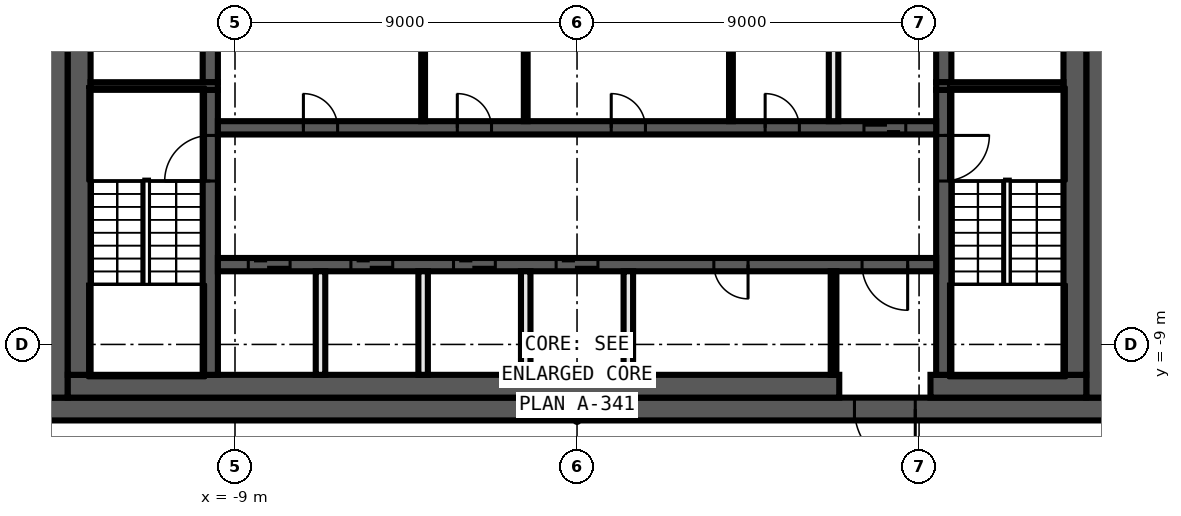
"""IFC4 building model, lengths in metres.
Left out: names, types, materials, properties, quantities, classifications, styles, units other than length and angle.
Written with IfcOpenShell. Run it as: python <this file> out.ifc"""

import sys

from ifc_helpers import new_model, si_unit, direction, frame, frame_2d, origin, place, context, subcontext, project, spatial, rectangle, extrude, element, fill, save


model = new_model("IFC4")
c1 = context("Model", 3, precision=1e-05, world=origin(), true_north=direction((0.0, 1.0)))
c2 = subcontext(c1, "Body", "Model", "MODEL_VIEW")
j1 = project(units=[si_unit("LENGTHUNIT", "METRE"), si_unit("PLANEANGLEUNIT", "RADIAN")], contexts=[c1])
p1 = place(None, origin())
s1 = spatial("IfcSite", under=j1, at=p1, CompositionType="ELEMENT")
p2 = place(p1, origin())
s2 = spatial("IfcBuilding", under=s1, at=p2, CompositionType="ELEMENT")
p3 = place(p2, frame((0.0, 0.0, 353.0)))
s3 = spatial("IfcBuildingStorey", under=s2, at=p3, CompositionType="ELEMENT", Elevation=353.0)
p4 = place(p3, frame((14.0, -10.7, 0.0), z_axis=(0.0, 0.0, 1.0), x_axis=(-1.0, 0.0, 0.0)))
e1 = element("IfcWall", 1, at=p4, inside=s3, PredefinedType="SHEAR", context=c2, shape_type="SweptSolid", body=[
    extrude(rectangle(XDim=28.0, YDim=0.6, at=frame_2d((14.0, 0.0))), origin(), (0.0, 0.0, 1.0), 5.6),
])
p5 = place(p4, frame((5.1, 0.0, 0.0)))
e2 = element("IfcOpeningElement", 2, at=p5, cuts=e1, PredefinedType="OPENING", context=c2, shape_type="SweptSolid", body=[
    extrude(rectangle(XDim=1.6, YDim=2.1, at=frame_2d((0.8, 1.05))), frame((0.0, 0.31, 0.0), z_axis=(0.0, -1.0, 0.0), x_axis=(1.0, 0.0, 0.0)), (0.0, 0.0, 1.0), 0.62),
])
for number, where, z_axis, x_axis in (
    (3, (13.7, 10.4, 0.0), (0.0, 0.0, 1.0), (0.0, -1.0, 0.0)),
    (4, (-13.7, -10.4, 0.0), (0.0, 0.0, 1.0), (0.0, 1.0, 0.0)),
):
    element("IfcWall", number, at=place(p3, frame(where, z_axis=z_axis, x_axis=x_axis)), inside=s3, PredefinedType="SHEAR", context=c2, shape_type="SweptSolid", body=[
        extrude(rectangle(XDim=20.8, YDim=0.6, at=frame_2d((10.4, 0.0))), origin(), (0.0, 0.0, 1.0), 5.6),
    ])
p6 = place(p3, frame((13.4, -10.1, 0.0), z_axis=(0.0, 0.0, 1.0), x_axis=(-1.0, 0.0, 0.0)))
e5 = element("IfcWall", 5, at=p6, inside=s3, PredefinedType="SHEAR", context=c2, shape_type="SweptSolid", body=[
    extrude(rectangle(XDim=4.1, YDim=0.6, at=frame_2d((2.05, 0.0))), origin(), (0.0, 0.0, 1.0), 5.6),
])
p7 = place(p3, frame((6.9, -10.1, 0.0), z_axis=(0.0, 0.0, 1.0), x_axis=(-1.0, 0.0, 0.0)))
e6 = element("IfcWall", 6, at=p7, inside=s3, PredefinedType="SHEAR", context=c2, shape_type="SweptSolid", body=[
    extrude(rectangle(XDim=20.3, YDim=0.6, at=frame_2d((10.15, 0.0))), origin(), (0.0, 0.0, 1.0), 5.6),
])
for number, where, z_axis, x_axis in (
    (7, (13.1, 9.8, 0.0), (0.0, 0.0, 1.0), (0.0, -1.0, 0.0)),
    (8, (-13.1, -9.8, 0.0), (0.0, 0.0, 1.0), (0.0, 1.0, 0.0)),
):
    element("IfcWall", number, at=place(p3, frame(where, z_axis=z_axis, x_axis=x_axis)), inside=s3, PredefinedType="SHEAR", context=c2, shape_type="SweptSolid", body=[
        extrude(rectangle(XDim=19.6, YDim=0.6, at=frame_2d((9.8, 0.0))), origin(), (0.0, 0.0, 1.0), 5.6),
    ])
p8 = place(p3, frame((9.65, -2.3, 0.0), z_axis=(0.0, 0.0, 1.0), x_axis=(0.0, -1.0, 0.0)))
e9 = element("IfcWall", 9, at=p8, inside=s3, PredefinedType="SHEAR", context=c2, shape_type="SweptSolid", body=[
    extrude(rectangle(XDim=7.5, YDim=0.4, at=frame_2d((3.75, 0.0))), origin(), (0.0, 0.0, 1.0), 5.6),
])
p9 = place(p8, frame((1.2, 0.0, 0.0)))
e10 = element("IfcOpeningElement", 10, at=p9, cuts=e9, PredefinedType="OPENING", context=c2, shape_type="SweptSolid", body=[
    extrude(rectangle(XDim=1.2, YDim=2.1, at=frame_2d((0.6, 1.05))), frame((0.0, 0.21, 0.0), z_axis=(0.0, -1.0, 0.0), x_axis=(1.0, 0.0, 0.0)), (0.0, 0.0, 1.0), 0.42),
])
p10 = place(p3, frame((9.65, 2.1, 0.0), z_axis=(0.0, 0.0, 1.0), x_axis=(0.0, -1.0, 0.0)))
e11 = element("IfcWall", 11, at=p10, inside=s3, PredefinedType="SHEAR", context=c2, shape_type="SweptSolid", body=[
    extrude(rectangle(XDim=4.2, YDim=0.4, at=frame_2d((2.1, 0.0))), origin(), (0.0, 0.0, 1.0), 5.6),
])
p11 = place(p10, frame((0.15, 0.0, 0.0)))
e12 = element("IfcOpeningElement", 12, at=p11, cuts=e11, PredefinedType="OPENING", context=c2, shape_type="SweptSolid", body=[
    extrude(rectangle(XDim=0.9, YDim=2.1, at=frame_2d((0.45, 1.05))), frame((0.0, 0.21, 0.0), z_axis=(0.0, -1.0, 0.0), x_axis=(1.0, 0.0, 0.0)), (0.0, 0.0, 1.0), 0.42),
])
p12 = place(p3, frame((-9.65, -9.8, 0.0), z_axis=(0.0, 0.0, 1.0), x_axis=(0.0, 1.0, 0.0)))
e13 = element("IfcWall", 13, at=p12, inside=s3, PredefinedType="SHEAR", context=c2, shape_type="SweptSolid", body=[
    extrude(rectangle(XDim=7.5, YDim=0.4, at=frame_2d((3.75, 0.0))), origin(), (0.0, 0.0, 1.0), 5.6),
])
p13 = place(p12, frame((5.1, 0.0, 0.0)))
e14 = element("IfcOpeningElement", 14, at=p13, cuts=e13, PredefinedType="OPENING", context=c2, shape_type="SweptSolid", body=[
    extrude(rectangle(XDim=1.2, YDim=2.1, at=frame_2d((0.6, 1.05))), frame((0.0, 0.21, 0.0), z_axis=(0.0, -1.0, 0.0), x_axis=(1.0, 0.0, 0.0)), (0.0, 0.0, 1.0), 0.42),
])
p14 = place(p3, frame((-9.65, -2.1, 0.0), z_axis=(0.0, 0.0, 1.0), x_axis=(0.0, 1.0, 0.0)))
e15 = element("IfcWall", 15, at=p14, inside=s3, PredefinedType="SHEAR", context=c2, shape_type="SweptSolid", body=[
    extrude(rectangle(XDim=4.2, YDim=0.4, at=frame_2d((2.1, 0.0))), origin(), (0.0, 0.0, 1.0), 5.6),
])
for number, where, z_axis, x_axis in (
    (16, (9.45, -2.2, 0.0), (0.0, 0.0, 1.0), (1.0, 0.0, 0.0)),
    (17, (-9.45, -2.2, 0.0), (0.0, 0.0, 1.0), (-1.0, 0.0, 0.0)),
):
    element("IfcWall", number, at=place(p3, frame(where, z_axis=z_axis, x_axis=x_axis)), inside=s3, PredefinedType="SHEAR", context=c2, shape_type="SweptSolid", body=[
        extrude(rectangle(XDim=3.35, YDim=0.2, at=frame_2d((1.675, 0.0))), origin(), (0.0, 0.0, 1.0), 5.6),
    ])
p15 = place(p3, frame((-9.45, -3.3, 0.0), z_axis=(0.0, 0.0, 1.0), x_axis=(1.0, 0.0, 0.0)))
e18 = element("IfcWall", 18, at=p15, inside=s3, PredefinedType="SHEAR", context=c2, shape_type="SweptSolid", body=[
    extrude(rectangle(XDim=18.9, YDim=0.35, at=frame_2d((9.45, 0.0))), origin(), (0.0, 0.0, 1.0), 5.6),
])
p16 = place(p15, frame((17.0, 0.0, 0.0)))
e19 = element("IfcOpeningElement", 19, at=p16, cuts=e18, PredefinedType="OPENING", context=c2, shape_type="SweptSolid", body=[
    extrude(rectangle(XDim=1.1, YDim=2.1, at=frame_2d((0.55, 1.05))), frame((0.0, 0.185, 0.0), z_axis=(0.0, -1.0, 0.0), x_axis=(1.0, 0.0, 0.0)), (0.0, 0.0, 1.0), 0.37),
])
p17 = place(p15, frame((2.25, 0.0, 0.0)))
e20 = element("IfcOpeningElement", 20, at=p17, cuts=e18, PredefinedType="OPENING", context=c2, shape_type="SweptSolid", body=[
    extrude(rectangle(XDim=0.9, YDim=2.1, at=frame_2d((0.45, 1.05))), frame((0.0, 0.185, 0.0), z_axis=(0.0, -1.0, 0.0), x_axis=(1.0, 0.0, 0.0)), (0.0, 0.0, 1.0), 0.37),
])
p18 = place(p15, frame((6.3, 0.0, 0.0)))
e21 = element("IfcOpeningElement", 21, at=p18, cuts=e18, PredefinedType="OPENING", context=c2, shape_type="SweptSolid", body=[
    extrude(rectangle(XDim=0.9, YDim=2.1, at=frame_2d((0.45, 1.05))), frame((0.0, 0.185, 0.0), z_axis=(0.0, -1.0, 0.0), x_axis=(1.0, 0.0, 0.0)), (0.0, 0.0, 1.0), 0.37),
])
p19 = place(p15, frame((10.35, 0.0, 0.0)))
e22 = element("IfcOpeningElement", 22, at=p19, cuts=e18, PredefinedType="OPENING", context=c2, shape_type="SweptSolid", body=[
    extrude(rectangle(XDim=0.9, YDim=2.1, at=frame_2d((0.45, 1.05))), frame((0.0, 0.185, 0.0), z_axis=(0.0, -1.0, 0.0), x_axis=(1.0, 0.0, 0.0)), (0.0, 0.0, 1.0), 0.37),
])
p20 = place(p15, frame((14.4, 0.0, 0.0)))
e23 = element("IfcOpeningElement", 23, at=p20, cuts=e18, PredefinedType="OPENING", context=c2, shape_type="SweptSolid", body=[
    extrude(rectangle(XDim=0.9, YDim=2.1, at=frame_2d((0.45, 1.05))), frame((0.0, 0.185, 0.0), z_axis=(0.0, -1.0, 0.0), x_axis=(1.0, 0.0, 0.0)), (0.0, 0.0, 1.0), 0.37),
])
p21 = place(p3, frame((9.45, -6.9, 0.0), z_axis=(0.0, 0.0, 1.0), x_axis=(-1.0, 0.0, 0.0)))
e24 = element("IfcWall", 24, at=p21, inside=s3, PredefinedType="SHEAR", context=c2, shape_type="SweptSolid", body=[
    extrude(rectangle(XDim=18.9, YDim=0.35, at=frame_2d((9.45, 0.0))), origin(), (0.0, 0.0, 1.0), 5.6),
])
p22 = place(p21, frame((17.0, 0.0, 0.0)))
e25 = element("IfcOpeningElement", 25, at=p22, cuts=e24, PredefinedType="OPENING", context=c2, shape_type="SweptSolid", body=[
    extrude(rectangle(XDim=1.1, YDim=2.1, at=frame_2d((0.55, 1.05))), frame((0.0, 0.185, 0.0), z_axis=(0.0, -1.0, 0.0), x_axis=(1.0, 0.0, 0.0)), (0.0, 0.0, 1.0), 0.37),
])
p23 = place(p21, frame((14.3, 0.0, 0.0)))
e26 = element("IfcOpeningElement", 26, at=p23, cuts=e24, PredefinedType="OPENING", context=c2, shape_type="SweptSolid", body=[
    extrude(rectangle(XDim=1.1, YDim=2.1, at=frame_2d((0.55, 1.05))), frame((0.0, 0.185, 0.0), z_axis=(0.0, -1.0, 0.0), x_axis=(1.0, 0.0, 0.0)), (0.0, 0.0, 1.0), 0.37),
])
p24 = place(p21, frame((11.6, 0.0, 0.0)))
e27 = element("IfcOpeningElement", 27, at=p24, cuts=e24, PredefinedType="OPENING", context=c2, shape_type="SweptSolid", body=[
    extrude(rectangle(XDim=1.1, YDim=2.1, at=frame_2d((0.55, 1.05))), frame((0.0, 0.185, 0.0), z_axis=(0.0, -1.0, 0.0), x_axis=(1.0, 0.0, 0.0)), (0.0, 0.0, 1.0), 0.37),
])
p25 = place(p21, frame((8.9, 0.0, 0.0)))
e28 = element("IfcOpeningElement", 28, at=p25, cuts=e24, PredefinedType="OPENING", context=c2, shape_type="SweptSolid", body=[
    extrude(rectangle(XDim=1.1, YDim=2.1, at=frame_2d((0.55, 1.05))), frame((0.0, 0.185, 0.0), z_axis=(0.0, -1.0, 0.0), x_axis=(1.0, 0.0, 0.0)), (0.0, 0.0, 1.0), 0.37),
])
p26 = place(p21, frame((0.75, 0.0, 0.0)))
e29 = element("IfcOpeningElement", 29, at=p26, cuts=e24, PredefinedType="OPENING", context=c2, shape_type="SweptSolid", body=[
    extrude(rectangle(XDim=1.2, YDim=2.1, at=frame_2d((0.6, 1.05))), frame((0.0, 0.185, 0.0), z_axis=(0.0, -1.0, 0.0), x_axis=(1.0, 0.0, 0.0)), (0.0, 0.0, 1.0), 0.37),
])
p27 = place(p21, frame((4.95, 0.0, 0.0)))
e30 = element("IfcOpeningElement", 30, at=p27, cuts=e24, PredefinedType="OPENING", context=c2, shape_type="SweptSolid", body=[
    extrude(rectangle(XDim=0.9, YDim=2.1, at=frame_2d((0.45, 1.05))), frame((0.0, 0.185, 0.0), z_axis=(0.0, -1.0, 0.0), x_axis=(1.0, 0.0, 0.0)), (0.0, 0.0, 1.0), 0.37),
])
p28 = place(p3, frame((6.75, -9.8, 0.0), z_axis=(0.0, 0.0, 1.0), x_axis=(0.0, 1.0, 0.0)))
e31 = element("IfcWall", 31, at=p28, inside=s3, PredefinedType="PARTITIONING", context=c2, shape_type="SweptSolid", body=[
    extrude(rectangle(XDim=2.725, YDim=0.15, at=frame_2d((1.363, 0.0))), origin(), (0.0, 0.0, 1.0), 5.6),
])
p29 = place(p3, frame((6.75, -3.125, 0.0), z_axis=(0.0, 0.0, 1.0), x_axis=(0.0, 1.0, 0.0)))
e32 = element("IfcWall", 32, at=p29, inside=s3, PredefinedType="SOLIDWALL", context=c2, shape_type="SweptSolid", body=[
    extrude(rectangle(XDim=2.725, YDim=0.25, at=frame_2d((1.363, 0.0))), origin(), (0.0, 0.0, 1.0), 5.6),
])
p30 = place(p3, frame((4.05, -3.125, 0.0), z_axis=(0.0, 0.0, 1.0), x_axis=(0.0, 1.0, 0.0)))
e33 = element("IfcWall", 33, at=p30, inside=s3, PredefinedType="PARTITIONING", context=c2, shape_type="SweptSolid", body=[
    extrude(rectangle(XDim=2.725, YDim=0.1, at=frame_2d((1.363, 0.0))), origin(), (0.0, 0.0, 1.0), 5.6),
])
p31 = place(p3, frame((1.35, -9.8, 0.0), z_axis=(0.0, 0.0, 1.0), x_axis=(0.0, 1.0, 0.0)))
e34 = element("IfcWall", 34, at=p31, inside=s3, PredefinedType="SOLIDWALL", context=c2, shape_type="SweptSolid", body=[
    extrude(rectangle(XDim=2.725, YDim=0.25, at=frame_2d((1.363, 0.0))), origin(), (0.0, 0.0, 1.0), 5.6),
])
p32 = place(p3, frame((-1.35, -3.125, 0.0), z_axis=(0.0, 0.0, 1.0), x_axis=(0.0, 1.0, 0.0)))
e35 = element("IfcWall", 35, at=p32, inside=s3, PredefinedType="PARTITIONING", context=c2, shape_type="SweptSolid", body=[
    extrude(rectangle(XDim=2.725, YDim=0.1, at=frame_2d((1.363, 0.0))), origin(), (0.0, 0.0, 1.0), 5.6),
])
p33 = place(p3, frame((-1.35, -9.8, 0.0), z_axis=(0.0, 0.0, 1.0), x_axis=(0.0, 1.0, 0.0)))
e36 = element("IfcWall", 36, at=p33, inside=s3, PredefinedType="SOLIDWALL", context=c2, shape_type="SweptSolid", body=[
    extrude(rectangle(XDim=2.725, YDim=0.25, at=frame_2d((1.363, 0.0))), origin(), (0.0, 0.0, 1.0), 5.6),
])
p34 = place(p3, frame((-4.05, -3.125, 0.0), z_axis=(0.0, 0.0, 1.0), x_axis=(0.0, 1.0, 0.0)))
e37 = element("IfcWall", 37, at=p34, inside=s3, PredefinedType="PARTITIONING", context=c2, shape_type="SweptSolid", body=[
    extrude(rectangle(XDim=2.725, YDim=0.1, at=frame_2d((1.363, 0.0))), origin(), (0.0, 0.0, 1.0), 5.6),
])
for number, where, z_axis, x_axis in (
    (38, (-4.05, -9.8, 0.0), (0.0, 0.0, 1.0), (0.0, 1.0, 0.0)),
    (39, (-6.75, -9.8, 0.0), (0.0, 0.0, 1.0), (0.0, 1.0, 0.0)),
):
    element("IfcWall", number, at=place(p3, frame(where, z_axis=z_axis, x_axis=x_axis)), inside=s3, PredefinedType="SOLIDWALL", context=c2, shape_type="SweptSolid", body=[
        extrude(rectangle(XDim=2.725, YDim=0.25, at=frame_2d((1.363, 0.0))), origin(), (0.0, 0.0, 1.0), 5.6),
    ])
p35 = place(p16, origin())
e40 = element("IfcDoor", 40, at=p35, inside=s3, OperationType="DOUBLE_DOOR_SLIDING", PredefinedType="DOOR", context=c2, shape_type="SweptSolid", body=[
    extrude(rectangle(XDim=1.1, YDim=2.1, at=frame_2d((0.55, 1.05))), frame((0.0, 0.025, 0.0), z_axis=(0.0, -1.0, 0.0), x_axis=(1.0, 0.0, 0.0)), (0.0, 0.0, 1.0), 0.05),
])
fill(e19, e40)
p36 = place(p22, origin())
e41 = element("IfcDoor", 41, at=p36, inside=s3, OperationType="DOUBLE_DOOR_SLIDING", PredefinedType="DOOR", context=c2, shape_type="SweptSolid", body=[
    extrude(rectangle(XDim=1.1, YDim=2.1, at=frame_2d((0.55, 1.05))), frame((0.0, 0.025, 0.0), z_axis=(0.0, -1.0, 0.0), x_axis=(1.0, 0.0, 0.0)), (0.0, 0.0, 1.0), 0.05),
])
fill(e25, e41)
p37 = place(p23, origin())
e42 = element("IfcDoor", 42, at=p37, inside=s3, OperationType="DOUBLE_DOOR_SLIDING", PredefinedType="DOOR", context=c2, shape_type="SweptSolid", body=[
    extrude(rectangle(XDim=1.1, YDim=2.1, at=frame_2d((0.55, 1.05))), frame((0.0, 0.025, 0.0), z_axis=(0.0, -1.0, 0.0), x_axis=(1.0, 0.0, 0.0)), (0.0, 0.0, 1.0), 0.05),
])
fill(e26, e42)
p38 = place(p24, origin())
e43 = element("IfcDoor", 43, at=p38, inside=s3, OperationType="DOUBLE_DOOR_SLIDING", PredefinedType="DOOR", context=c2, shape_type="SweptSolid", body=[
    extrude(rectangle(XDim=1.1, YDim=2.1, at=frame_2d((0.55, 1.05))), frame((0.0, 0.025, 0.0), z_axis=(0.0, -1.0, 0.0), x_axis=(1.0, 0.0, 0.0)), (0.0, 0.0, 1.0), 0.05),
])
fill(e27, e43)
p39 = place(p25, origin())
e44 = element("IfcDoor", 44, at=p39, inside=s3, OperationType="DOUBLE_DOOR_SLIDING", PredefinedType="DOOR", context=c2, shape_type="SweptSolid", body=[
    extrude(rectangle(XDim=1.1, YDim=2.1, at=frame_2d((0.55, 1.05))), frame((0.0, 0.025, 0.0), z_axis=(0.0, -1.0, 0.0), x_axis=(1.0, 0.0, 0.0)), (0.0, 0.0, 1.0), 0.05),
])
fill(e28, e44)
p40 = place(p5, origin())
e45 = element("IfcDoor", 45, at=p40, inside=s3, OperationType="DOUBLE_DOOR_SINGLE_SWING", PredefinedType="DOOR", context=c2, shape_type="SweptSolid", body=[
    extrude(rectangle(XDim=1.6, YDim=2.1, at=frame_2d((0.8, 1.05))), frame((0.0, 0.025, 0.0), z_axis=(0.0, -1.0, 0.0), x_axis=(1.0, 0.0, 0.0)), (0.0, 0.0, 1.0), 0.05),
])
fill(e2, e45)
p41 = place(p26, origin())
e46 = element("IfcDoor", 46, at=p41, inside=s3, OperationType="SINGLE_SWING_LEFT", PredefinedType="DOOR", context=c2, shape_type="SweptSolid", body=[
    extrude(rectangle(XDim=1.2, YDim=2.1, at=frame_2d((0.6, 1.05))), frame((0.0, 0.025, 0.0), z_axis=(0.0, -1.0, 0.0), x_axis=(1.0, 0.0, 0.0)), (0.0, 0.0, 1.0), 0.05),
])
fill(e29, e46)
p42 = place(p17, origin())
e47 = element("IfcDoor", 47, at=p42, inside=s3, OperationType="SINGLE_SWING_LEFT", PredefinedType="DOOR", context=c2, shape_type="SweptSolid", body=[
    extrude(rectangle(XDim=0.9, YDim=2.1, at=frame_2d((0.45, 1.05))), frame((0.0, 0.025, 0.0), z_axis=(0.0, -1.0, 0.0), x_axis=(1.0, 0.0, 0.0)), (0.0, 0.0, 1.0), 0.05),
])
fill(e20, e47)
p43 = place(p18, origin())
e48 = element("IfcDoor", 48, at=p43, inside=s3, OperationType="SINGLE_SWING_RIGHT", PredefinedType="DOOR", context=c2, shape_type="SweptSolid", body=[
    extrude(rectangle(XDim=0.9, YDim=2.1, at=frame_2d((0.45, 1.05))), frame((0.0, 0.025, 0.0), z_axis=(0.0, -1.0, 0.0), x_axis=(1.0, 0.0, 0.0)), (0.0, 0.0, 1.0), 0.05),
])
fill(e21, e48)
p44 = place(p19, origin())
e49 = element("IfcDoor", 49, at=p44, inside=s3, OperationType="SINGLE_SWING_LEFT", PredefinedType="DOOR", context=c2, shape_type="SweptSolid", body=[
    extrude(rectangle(XDim=0.9, YDim=2.1, at=frame_2d((0.45, 1.05))), frame((0.0, 0.025, 0.0), z_axis=(0.0, -1.0, 0.0), x_axis=(1.0, 0.0, 0.0)), (0.0, 0.0, 1.0), 0.05),
])
fill(e22, e49)
p45 = place(p20, origin())
e50 = element("IfcDoor", 50, at=p45, inside=s3, OperationType="SINGLE_SWING_RIGHT", PredefinedType="DOOR", context=c2, shape_type="SweptSolid", body=[
    extrude(rectangle(XDim=0.9, YDim=2.1, at=frame_2d((0.45, 1.05))), frame((0.0, 0.025, 0.0), z_axis=(0.0, -1.0, 0.0), x_axis=(1.0, 0.0, 0.0)), (0.0, 0.0, 1.0), 0.05),
])
fill(e23, e50)
p46 = place(p27, origin())
e51 = element("IfcDoor", 51, at=p46, inside=s3, OperationType="SINGLE_SWING_LEFT", PredefinedType="DOOR", context=c2, shape_type="SweptSolid", body=[
    extrude(rectangle(XDim=0.9, YDim=2.1, at=frame_2d((0.45, 1.05))), frame((0.0, 0.025, 0.0), z_axis=(0.0, -1.0, 0.0), x_axis=(1.0, 0.0, 0.0)), (0.0, 0.0, 1.0), 0.05),
])
fill(e30, e51)
p47 = place(p9, origin())
e52 = element("IfcDoor", 52, at=p47, inside=s3, OperationType="SINGLE_SWING_RIGHT", PredefinedType="DOOR", context=c2, shape_type="SweptSolid", body=[
    extrude(rectangle(XDim=1.2, YDim=2.1, at=frame_2d((0.6, 1.05))), frame((0.0, 0.025, 0.0), z_axis=(0.0, -1.0, 0.0), x_axis=(1.0, 0.0, 0.0)), (0.0, 0.0, 1.0), 0.05),
])
fill(e10, e52)
p48 = place(p13, origin())
e53 = element("IfcDoor", 53, at=p48, inside=s3, OperationType="SINGLE_SWING_LEFT", PredefinedType="DOOR", context=c2, shape_type="SweptSolid", body=[
    extrude(rectangle(XDim=1.2, YDim=2.1, at=frame_2d((0.6, 1.05))), frame((0.0, 0.025, 0.0), z_axis=(0.0, -1.0, 0.0), x_axis=(1.0, 0.0, 0.0)), (0.0, 0.0, 1.0), 0.05),
])
fill(e14, e53)
save(model, sys.argv[1])
